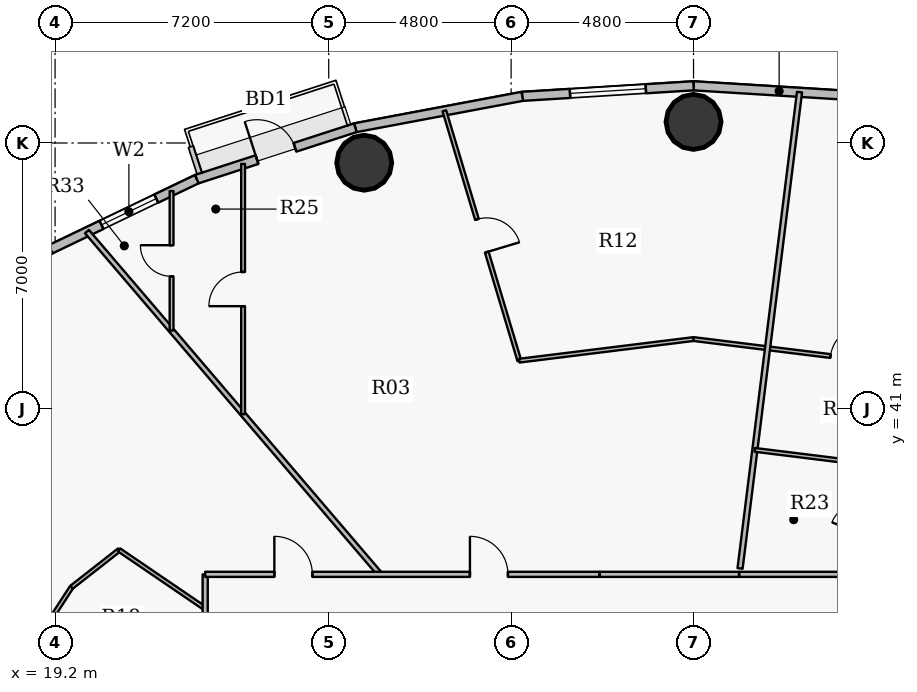
"""IFC4 building model, lengths in metres.
Left out: names, types, materials, properties, quantities, classifications, styles, units other than length and angle.
Written with IfcOpenShell. Run it as: python <this file> out.ifc"""

import sys

from ifc_helpers import new_model, si_unit, direction, frame, frame_2d, origin, origin_2d, place, context, subcontext, project, spatial, rectangle, hollow_circle, extrude, source, transform, mapped, element, fill, save


model = new_model("IFC4")
c1 = context("Model", 3, precision=1e-05, world=origin(), true_north=direction((0.0, 1.0)))
c2 = subcontext(c1, "Body", "Model", "MODEL_VIEW")
j1 = project(units=[si_unit("LENGTHUNIT", "METRE"), si_unit("PLANEANGLEUNIT", "RADIAN")], contexts=[c1])
p1 = place(None, origin())
s1 = spatial("IfcSite", under=j1, at=p1, CompositionType="ELEMENT")
p2 = place(p1, origin())
s2 = spatial("IfcBuilding", under=s1, at=p2, CompositionType="ELEMENT")
p3 = place(p2, frame((0.0, 0.0, 104.7)))
s3 = spatial("IfcBuildingStorey", under=s2, at=p3, CompositionType="ELEMENT", Elevation=104.7)
for number, where, z_axis, x_axis in (
    (1, (36.0, 48.555, 0.0), (0.0, 0.0, 1.0), (1.0, 0.0, 0.0)),
    (2, (27.334, 47.481, 0.0), (0.0, 0.0, 1.0), (1.0, 0.0, 0.0)),
):
    element("IfcColumn", number, at=place(p3, frame(where, z_axis=z_axis, x_axis=x_axis)), inside=s3, PredefinedType="COLUMN", context=c2, shape_type="SweptSolid", body=[
        extrude(hollow_circle(Radius=0.725, WallThickness=0.042, at=origin_2d()), origin(), (0.0, 0.0, 1.0), 3.75),
    ])
p4 = place(p3, frame((36.0, 49.505, 0.0), z_axis=(0.0, 0.0, 1.0), x_axis=(0.998107531589, -0.061492726276, 0.0)))
e3 = element("IfcWall", 3, at=p4, inside=s3, PredefinedType="SOLIDWALL", context=c2, shape_type="SweptSolid", body=[
    extrude(rectangle(XDim=4.514, YDim=0.24, at=frame_2d((2.257, 0.0))), origin(), (0.0, 0.0, 1.0), 3.5),
])
p5 = place(p3, frame((31.494, 49.227, 0.0), z_axis=(0.0, 0.0, 1.0), x_axis=(0.998107531589, 0.061492726276, 0.0)))
e4 = element("IfcWall", 4, at=p5, inside=s3, PredefinedType="SOLIDWALL", context=c2, shape_type="SweptSolid", body=[
    extrude(rectangle(XDim=4.514, YDim=0.24, at=frame_2d((2.257, 0.0))), origin(), (0.0, 0.0, 1.0), 3.5),
])
p6 = place(p5, frame((1.257, 0.0, 0.9)))
e5 = element("IfcOpeningElement", 5, at=p6, cuts=e4, PredefinedType="OPENING", context=c2, shape_type="SweptSolid", body=[
    extrude(rectangle(XDim=2.0, YDim=1.75, at=origin_2d()), frame((1.0, 0.13, 0.875), z_axis=(0.0, -1.0, 0.0), x_axis=(1.0, 0.0, 0.0)), (0.0, 0.0, 1.0), 0.26),
])
p7 = place(p3, frame((27.1, 48.401, 0.0), z_axis=(0.0, 0.0, 1.0), x_axis=(0.982789252177, 0.184730305596, 0.0)))
e6 = element("IfcWall", 6, at=p7, inside=s3, PredefinedType="SOLIDWALL", context=c2, shape_type="SweptSolid", body=[
    extrude(rectangle(XDim=4.471, YDim=0.24, at=frame_2d((2.235, 0.0))), origin(), (0.0, 0.0, 1.0), 3.5),
])
p8 = place(p3, frame((22.926, 47.047, 0.0), z_axis=(0.0, 0.0, 1.0), x_axis=(0.951211346073, 0.308540070495, 0.0)))
e7 = element("IfcWall", 7, at=p8, inside=s3, PredefinedType="SOLIDWALL", context=c2, shape_type="SweptSolid", body=[
    extrude(rectangle(XDim=4.388, YDim=0.24, at=frame_2d((2.194, 0.0))), origin(), (0.0, 0.0, 1.0), 3.5),
])
p9 = place(p8, frame((1.669, 0.0, 0.0)))
e8 = element("IfcOpeningElement", 8, at=p9, cuts=e7, PredefinedType="OPENING", context=c2, shape_type="SweptSolid", body=[
    extrude(rectangle(XDim=1.05, YDim=2.15, at=origin_2d()), frame((0.525, 0.13, 1.075), z_axis=(0.0, -1.0, 0.0), x_axis=(1.0, 0.0, 0.0)), (0.0, 0.0, 1.0), 0.26),
])
p10 = place(p3, frame((19.075, 45.199, 0.0), z_axis=(0.0, 0.0, 1.0), x_axis=(0.901589935876, 0.432591709962, 0.0)))
e9 = element("IfcWall", 9, at=p10, inside=s3, PredefinedType="SOLIDWALL", context=c2, shape_type="SweptSolid", body=[
    extrude(rectangle(XDim=4.272, YDim=0.24, at=frame_2d((2.136, 0.0))), origin(), (0.0, 0.0, 1.0), 3.5),
])
p11 = place(p10, frame((1.493, 0.0, 0.9)))
e10 = element("IfcOpeningElement", 10, at=p11, cuts=e9, PredefinedType="OPENING", context=c2, shape_type="SweptSolid", body=[
    extrude(rectangle(XDim=1.6, YDim=1.75, at=origin_2d()), frame((0.8, 0.13, 0.875), z_axis=(0.0, -1.0, 0.0), x_axis=(1.0, 0.0, 0.0)), (0.0, 0.0, 1.0), 0.26),
])
p12 = place(p3, frame((15.642, 42.903, 0.0), z_axis=(0.0, 0.0, 1.0), x_axis=(0.831221811447, 0.555940914284, 0.0)))
e11 = element("IfcWall", 11, at=p12, inside=s3, PredefinedType="SOLIDWALL", context=c2, shape_type="SweptSolid", body=[
    extrude(rectangle(XDim=4.13, YDim=0.24, at=frame_2d((2.065, 0.0))), origin(), (0.0, 0.0, 1.0), 3.5),
])
p13 = place(p12, frame((1.065, 0.0, 0.9)))
e12 = element("IfcOpeningElement", 12, at=p13, cuts=e11, PredefinedType="OPENING", context=c2, shape_type="SweptSolid", body=[
    extrude(rectangle(XDim=2.0, YDim=1.75, at=origin_2d()), frame((1.0, 0.13, 0.875), z_axis=(0.0, -1.0, 0.0), x_axis=(1.0, 0.0, 0.0)), (0.0, 0.0, 1.0), 0.26),
])
p14 = place(p3, frame((9.741, 36.057, 0.0), z_axis=(0.0, 0.0, 1.0), x_axis=(0.945349748634, -0.326058051207, 0.0)))
e13 = element("IfcWall", 13, at=p14, inside=s3, PredefinedType="PARTITIONING", context=c2, shape_type="SweptSolid", body=[
    extrude(rectangle(XDim=14.184, YDim=0.135, at=frame_2d((7.092, 0.0))), origin(), (0.0, 0.0, 1.0), 2.935),
])
p15 = place(p3, frame((16.76, 31.895, 0.0), z_axis=(0.0, 0.0, 1.0), x_axis=(0.545405249109, 0.838172484781, 0.0)))
e14 = element("IfcWall", 14, at=p15, inside=s3, PredefinedType="PARTITIONING", context=c2, shape_type="SweptSolid", body=[
    extrude(rectangle(XDim=5.269, YDim=0.1, at=frame_2d((2.634, 0.0))), origin(), (0.0, 0.0, 1.0), 2.935),
])
p16 = place(p15, frame((3.012, 0.0, 0.0)))
e15 = element("IfcOpeningElement", 15, at=p16, cuts=e14, PredefinedType="OPENING", context=c2, shape_type="SweptSolid", body=[
    extrude(rectangle(XDim=0.9, YDim=2.1, at=origin_2d()), frame((0.45, 0.06, 1.05), z_axis=(0.0, -1.0, 0.0), x_axis=(1.0, 0.0, 0.0)), (0.0, 0.0, 1.0), 0.12),
])
p17 = place(p3, frame((19.634, 36.311, 0.0), z_axis=(0.0, 0.0, 1.0), x_axis=(0.787313775385, 0.616552527437, 0.0)))
e16 = element("IfcWall", 16, at=p17, inside=s3, PredefinedType="PARTITIONING", context=c2, shape_type="SweptSolid", body=[
    extrude(rectangle(XDim=1.59, YDim=0.1, at=frame_2d((0.795, 0.0))), origin(), (0.0, 0.0, 1.0), 3.5),
])
p18 = place(p3, frame((20.04, 45.668, 0.0), z_axis=(0.0, 0.0, 1.0), x_axis=(0.649828321201, -0.760081017369, 0.0)))
e17 = element("IfcWall", 17, at=p18, inside=s3, PredefinedType="PARTITIONING", context=c2, shape_type="SweptSolid", body=[
    extrude(rectangle(XDim=11.865, YDim=0.135, at=frame_2d((5.932, 0.0))), origin(), (0.0, 0.0, 1.0), 2.935),
])
p19 = place(p3, frame((20.885, 37.291, 0.0), z_axis=(0.0, 0.0, 1.0), x_axis=(0.826581607155, -0.562816885596, 0.0)))
e18 = element("IfcWall", 18, at=p19, inside=s3, PredefinedType="PARTITIONING", context=c2, shape_type="SweptSolid", body=[
    extrude(rectangle(XDim=2.74, YDim=0.1, at=frame_2d((1.37, 0.0))), origin(), (0.0, 0.0, 1.0), 3.5),
])
p20 = place(p3, frame((22.265, 43.064, 0.0), z_axis=(0.0, 0.0, 1.0), x_axis=(0.0, 1.0, 0.0)))
e19 = element("IfcWall", 19, at=p20, inside=s3, PredefinedType="PARTITIONING", context=c2, shape_type="SweptSolid", body=[
    extrude(rectangle(XDim=3.671, YDim=0.1, at=frame_2d((1.836, 0.0))), origin(), (0.0, 0.0, 1.0), 2.935),
])
p21 = place(p20, frame((1.426, 0.0, 0.0)))
e20 = element("IfcOpeningElement", 20, at=p21, cuts=e19, PredefinedType="OPENING", context=c2, shape_type="SweptSolid", body=[
    extrude(rectangle(XDim=0.82, YDim=2.1, at=origin_2d()), frame((0.41, 0.06, 1.05), z_axis=(0.0, -1.0, 0.0), x_axis=(1.0, 0.0, 0.0)), (0.0, 0.0, 1.0), 0.12),
])
p22 = place(p3, frame((23.15, 17.35, 0.0), z_axis=(0.0, 0.0, 1.0), x_axis=(0.0, 1.0, 0.0)))
e21 = element("IfcWall", 21, at=p22, inside=s3, PredefinedType="PARTITIONING", context=c2, shape_type="SweptSolid", body=[
    extrude(rectangle(XDim=19.3, YDim=0.135, at=frame_2d((9.65, 0.0))), origin(), (0.0, 0.0, 1.0), 2.935),
])
p23 = place(p22, frame((7.86, 0.0, 0.0)))
e22 = element("IfcOpeningElement", 22, at=p23, cuts=e21, PredefinedType="OPENING", context=c2, shape_type="SweptSolid", body=[
    extrude(rectangle(XDim=1.0, YDim=2.15, at=origin_2d()), frame((0.5, 0.078, 1.075), z_axis=(0.0, -1.0, 0.0), x_axis=(1.0, 0.0, 0.0)), (0.0, 0.0, 1.0), 0.155),
])
p24 = place(p3, frame((23.15, 36.65, 0.0), z_axis=(0.0, 0.0, 1.0), x_axis=(1.0, 0.0, 0.0)))
e23 = element("IfcWall", 23, at=p24, inside=s3, PredefinedType="PARTITIONING", context=c2, shape_type="SweptSolid", body=[
    extrude(rectangle(XDim=10.373, YDim=0.135, at=frame_2d((5.187, 0.0))), origin(), (0.0, 0.0, 1.0), 2.935),
])
p25 = place(p24, frame((6.966, 0.0, 0.0)))
e24 = element("IfcOpeningElement", 24, at=p25, cuts=e23, PredefinedType="OPENING", context=c2, shape_type="SweptSolid", body=[
    extrude(rectangle(XDim=1.0, YDim=2.15, at=origin_2d()), frame((0.5, 0.078, 1.075), z_axis=(0.0, -1.0, 0.0), x_axis=(1.0, 0.0, 0.0)), (0.0, 0.0, 1.0), 0.155),
])
p26 = place(p24, frame((1.82, 0.0, 0.0)))
e25 = element("IfcOpeningElement", 25, at=p26, cuts=e23, PredefinedType="OPENING", context=c2, shape_type="SweptSolid", body=[
    extrude(rectangle(XDim=1.0, YDim=2.15, at=origin_2d()), frame((0.5, 0.078, 1.075), z_axis=(0.0, -1.0, 0.0), x_axis=(1.0, 0.0, 0.0)), (0.0, 0.0, 1.0), 0.155),
])
p27 = place(p3, frame((24.147, 40.864, 0.0), z_axis=(0.0, 0.0, 1.0), x_axis=(0.0, 1.0, 0.0)))
e26 = element("IfcWall", 26, at=p27, inside=s3, PredefinedType="PARTITIONING", context=c2, shape_type="SweptSolid", body=[
    extrude(rectangle(XDim=6.585, YDim=0.1, at=frame_2d((3.292, 0.0))), origin(), (0.0, 0.0, 1.0), 2.935),
])
p28 = place(p27, frame((2.843, 0.0, 0.0)))
e27 = element("IfcOpeningElement", 27, at=p28, cuts=e26, PredefinedType="OPENING", context=c2, shape_type="SweptSolid", body=[
    extrude(rectangle(XDim=0.9, YDim=2.1, at=origin_2d()), frame((0.45, 0.06, 1.05), z_axis=(0.0, -1.0, 0.0), x_axis=(1.0, 0.0, 0.0)), (0.0, 0.0, 1.0), 0.12),
])
p29 = place(p3, frame((29.443, 48.847, 0.0), z_axis=(0.0, 0.0, 1.0), x_axis=(0.287465357653, -0.957791035743, 0.0)))
e28 = element("IfcWall", 28, at=p29, inside=s3, PredefinedType="PARTITIONING", context=c2, shape_type="SweptSolid", body=[
    extrude(rectangle(XDim=6.864, YDim=0.1, at=frame_2d((3.432, 0.0))), origin(), (0.0, 0.0, 1.0), 2.935),
])
p30 = place(p29, frame((2.982, 0.0, 0.0)))
e29 = element("IfcOpeningElement", 29, at=p30, cuts=e28, PredefinedType="OPENING", context=c2, shape_type="SweptSolid", body=[
    extrude(rectangle(XDim=0.9, YDim=2.1, at=origin_2d()), frame((0.45, 0.06, 1.05), z_axis=(0.0, -1.0, 0.0), x_axis=(1.0, 0.0, 0.0)), (0.0, 0.0, 1.0), 0.12),
])
p31 = place(p3, frame((31.416, 42.272, 0.0), z_axis=(0.0, 0.0, 1.0), x_axis=(0.992393726446, 0.12310439355, 0.0)))
e30 = element("IfcWall", 30, at=p31, inside=s3, PredefinedType="PARTITIONING", context=c2, shape_type="SweptSolid", body=[
    extrude(rectangle(XDim=4.619, YDim=0.1, at=frame_2d((2.31, 0.0))), origin(), (0.0, 0.0, 1.0), 2.935),
])
p32 = place(p3, frame((36.0, 42.841, 0.0), z_axis=(0.0, 0.0, 1.0), x_axis=(0.992393593066, -0.123105468776, 0.0)))
e31 = element("IfcWall", 31, at=p32, inside=s3, PredefinedType="PARTITIONING", context=c2, shape_type="SweptSolid", body=[
    extrude(rectangle(XDim=6.241, YDim=0.1, at=frame_2d((3.121, 0.0))), origin(), (0.0, 0.0, 1.0), 2.935),
])
p33 = place(p32, frame((3.632, 0.0, 0.0)))
e32 = element("IfcOpeningElement", 32, at=p33, cuts=e31, PredefinedType="OPENING", context=c2, shape_type="SweptSolid", body=[
    extrude(rectangle(XDim=0.9, YDim=2.1, at=origin_2d()), frame((0.45, 0.06, 1.05), z_axis=(0.0, -1.0, 0.0), x_axis=(1.0, 0.0, 0.0)), (0.0, 0.0, 1.0), 0.12),
])
p34 = place(p3, frame((37.205, 36.65, 0.0), z_axis=(0.0, 0.0, 1.0), x_axis=(1.0, 0.0, 0.0)))
e33 = element("IfcWall", 33, at=p34, inside=s3, PredefinedType="PARTITIONING", context=c2, shape_type="SweptSolid", body=[
    extrude(rectangle(XDim=11.499, YDim=0.135, at=frame_2d((5.75, 0.0))), origin(), (0.0, 0.0, 1.0), 2.935),
])
p35 = place(p34, frame((3.988, 0.0, 0.0)))
e34 = element("IfcOpeningElement", 34, at=p35, cuts=e33, PredefinedType="OPENING", context=c2, shape_type="SweptSolid", body=[
    extrude(rectangle(XDim=1.0, YDim=2.15, at=origin_2d()), frame((0.5, 0.078, 1.075), z_axis=(0.0, -1.0, 0.0), x_axis=(1.0, 0.0, 0.0)), (0.0, 0.0, 1.0), 0.155),
])
p36 = place(p3, frame((37.224, 36.805, 0.0), z_axis=(0.0, 0.0, 1.0), x_axis=(0.123906262398, 0.992293927291, 0.0)))
e35 = element("IfcWall", 35, at=p36, inside=s3, PredefinedType="PARTITIONING", context=c2, shape_type="SweptSolid", body=[
    extrude(rectangle(XDim=12.63, YDim=0.135, at=frame_2d((6.315, 0.0))), origin(), (0.0, 0.0, 1.0), 2.935),
])
p37 = place(p3, frame((37.614, 39.925, 0.0), z_axis=(0.0, 0.0, 1.0), x_axis=(0.992397148182, -0.123076806427, 0.0)))
e36 = element("IfcWall", 36, at=p37, inside=s3, PredefinedType="PARTITIONING", context=c2, shape_type="SweptSolid", body=[
    extrude(rectangle(XDim=3.545, YDim=0.1, at=frame_2d((1.772, 0.0))), origin(), (0.0, 0.0, 1.0), 3.5),
])
p38 = place(p3, frame((33.533, 36.65, 0.0), z_axis=(0.0, 0.0, 1.0), x_axis=(1.0, 0.0, 0.0)))
e37 = element("IfcWall", 37, at=p38, inside=s3, PredefinedType="PARTITIONING", context=c2, shape_type="SweptSolid", body=[
    extrude(rectangle(XDim=3.662, YDim=0.135, at=frame_2d((1.831, 0.0))), origin(), (0.0, 0.0, 1.0), 2.935),
])
m1 = source(origin(), c2, "Body", "SweptSolid", [
    extrude(rectangle(XDim=2.0, YDim=1.75, at=origin_2d()), frame((1.0, 0.03, 0.875), z_axis=(0.0, -1.0, 0.0), x_axis=(1.0, 0.0, 0.0)), (0.0, 0.0, 1.0), 0.06),
])
p39 = place(p6, origin())
e38 = element("IfcWindow", 38, at=p39, inside=s3, PartitioningType="DOUBLE_PANEL_VERTICAL", PredefinedType="WINDOW", context=c2, shape_type="MappedRepresentation", body=[
    mapped(m1, transform((0.0, 0.0, 0.0), x_axis=(1.0, 0.0, 0.0), y_axis=(0.0, 1.0, 0.0), z_axis=(0.0, 0.0, 1.0), scale=1.0)),
])
fill(e5, e38)
m2 = source(origin(), c2, "Body", "SweptSolid", [
    extrude(rectangle(XDim=1.05, YDim=2.15, at=origin_2d()), frame((0.525, 0.025, 1.075), z_axis=(0.0, -1.0, 0.0), x_axis=(1.0, 0.0, 0.0)), (0.0, 0.0, 1.0), 0.05),
])
p40 = place(p9, origin())
e39 = element("IfcDoor", 39, at=p40, inside=s3, OperationType="SINGLE_SWING_LEFT", PredefinedType="DOOR", context=c2, shape_type="MappedRepresentation", body=[
    mapped(m2, transform((0.0, 0.0, 0.0), x_axis=(1.0, 0.0, 0.0), y_axis=(0.0, 1.0, 0.0), z_axis=(0.0, 0.0, 1.0), scale=1.0)),
])
fill(e8, e39)
m3 = source(origin(), c2, "Body", "SweptSolid", [
    extrude(rectangle(XDim=1.6, YDim=1.75, at=origin_2d()), frame((0.8, 0.03, 0.875), z_axis=(0.0, -1.0, 0.0), x_axis=(1.0, 0.0, 0.0)), (0.0, 0.0, 1.0), 0.06),
])
p41 = place(p11, origin())
e40 = element("IfcWindow", 40, at=p41, inside=s3, PartitioningType="DOUBLE_PANEL_VERTICAL", PredefinedType="WINDOW", context=c2, shape_type="MappedRepresentation", body=[
    mapped(m3, transform((0.0, 0.0, 0.0), x_axis=(1.0, 0.0, 0.0), y_axis=(0.0, 1.0, 0.0), z_axis=(0.0, 0.0, 1.0), scale=1.0)),
])
fill(e10, e40)
m4 = source(origin(), c2, "Body", "SweptSolid", [
    extrude(rectangle(XDim=0.9, YDim=2.1, at=origin_2d()), frame((0.45, 0.025, 1.05), z_axis=(0.0, -1.0, 0.0), x_axis=(1.0, 0.0, 0.0)), (0.0, 0.0, 1.0), 0.05),
])
p42 = place(p33, origin())
e41 = element("IfcDoor", 41, at=p42, inside=s3, OperationType="SINGLE_SWING_RIGHT", PredefinedType="DOOR", context=c2, shape_type="MappedRepresentation", body=[
    mapped(m4, transform((0.0, 0.0, 0.0), x_axis=(1.0, 0.0, 0.0), y_axis=(0.0, 1.0, 0.0), z_axis=(0.0, 0.0, 1.0), scale=1.0)),
])
fill(e32, e41)
m5 = source(origin(), c2, "Body", "SweptSolid", [
    extrude(rectangle(XDim=1.0, YDim=2.15, at=origin_2d()), frame((0.5, 0.025, 1.075), z_axis=(0.0, -1.0, 0.0), x_axis=(1.0, 0.0, 0.0)), (0.0, 0.0, 1.0), 0.05),
])
p43 = place(p25, origin())
e42 = element("IfcDoor", 42, at=p43, inside=s3, OperationType="SINGLE_SWING_LEFT", PredefinedType="DOOR", context=c2, shape_type="MappedRepresentation", body=[
    mapped(m5, transform((0.0, 0.0, 0.0), x_axis=(1.0, 0.0, 0.0), y_axis=(0.0, 1.0, 0.0), z_axis=(0.0, 0.0, 1.0), scale=1.0)),
])
fill(e24, e42)
p44 = place(p30, origin())
e43 = element("IfcDoor", 43, at=p44, inside=s3, OperationType="SINGLE_SWING_RIGHT", PredefinedType="DOOR", context=c2, shape_type="MappedRepresentation", body=[
    mapped(m4, transform((0.0, 0.0, 0.0), x_axis=(1.0, 0.0, 0.0), y_axis=(0.0, 1.0, 0.0), z_axis=(0.0, 0.0, 1.0), scale=1.0)),
])
fill(e29, e43)
p45 = place(p28, origin())
e44 = element("IfcDoor", 44, at=p45, inside=s3, OperationType="SINGLE_SWING_LEFT", PredefinedType="DOOR", context=c2, shape_type="MappedRepresentation", body=[
    mapped(m4, transform((0.0, 0.0, 0.0), x_axis=(1.0, 0.0, 0.0), y_axis=(0.0, 1.0, 0.0), z_axis=(0.0, 0.0, 1.0), scale=1.0)),
])
fill(e27, e44)
m6 = source(origin(), c2, "Body", "SweptSolid", [
    extrude(rectangle(XDim=0.82, YDim=2.1, at=origin_2d()), frame((0.41, 0.025, 1.05), z_axis=(0.0, -1.0, 0.0), x_axis=(1.0, 0.0, 0.0)), (0.0, 0.0, 1.0), 0.05),
])
p46 = place(p21, origin())
e45 = element("IfcDoor", 45, at=p46, inside=s3, OperationType="SINGLE_SWING_RIGHT", PredefinedType="DOOR", context=c2, shape_type="MappedRepresentation", body=[
    mapped(m6, transform((0.0, 0.0, 0.0), x_axis=(1.0, 0.0, 0.0), y_axis=(0.0, 1.0, 0.0), z_axis=(0.0, 0.0, 1.0), scale=1.0)),
])
fill(e20, e45)
p47 = place(p26, origin())
e46 = element("IfcDoor", 46, at=p47, inside=s3, OperationType="SINGLE_SWING_LEFT", PredefinedType="DOOR", context=c2, shape_type="MappedRepresentation", body=[
    mapped(m5, transform((0.0, 0.0, 0.0), x_axis=(1.0, 0.0, 0.0), y_axis=(0.0, 1.0, 0.0), z_axis=(0.0, 0.0, 1.0), scale=1.0)),
])
fill(e25, e46)
save(model, sys.argv[1])
